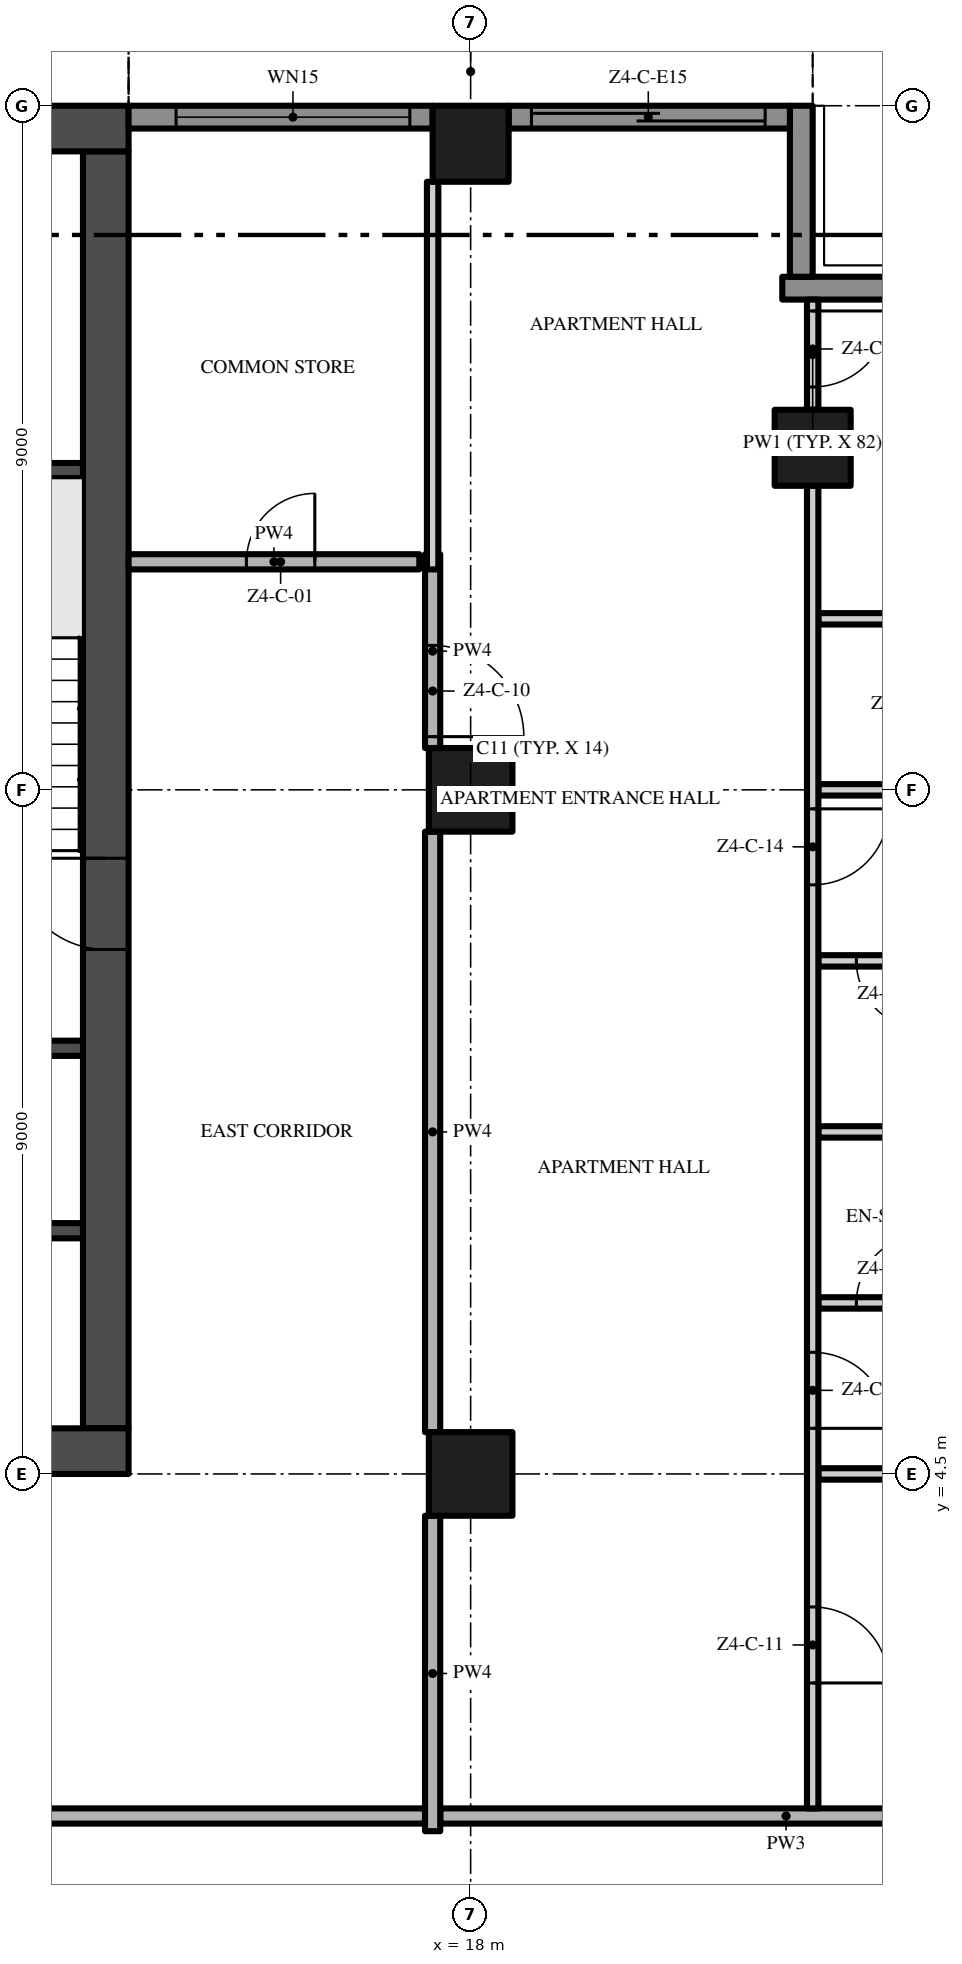
"""IFC4 building model, lengths in metres.
Left out: names, types, materials, properties, quantities, classifications, styles, units other than length and angle.
Written with IfcOpenShell. Run it as: python <this file> out.ifc"""

import sys

from ifc_helpers import new_model, si_unit, direction, frame, frame_2d, origin, origin_2d, place, context, subcontext, project, spatial, rectangle, extrude, element, fill, save


model = new_model("IFC4")
c1 = context("Model", 3, precision=1e-05, world=origin(), true_north=direction((0.0, 1.0)))
c2 = subcontext(c1, "Body", "Model", "MODEL_VIEW")
j1 = project(units=[si_unit("LENGTHUNIT", "METRE"), si_unit("PLANEANGLEUNIT", "RADIAN")], contexts=[c1])
p1 = place(None, origin())
s1 = spatial("IfcSite", under=j1, at=p1, CompositionType="ELEMENT")
p2 = place(p1, origin())
s2 = spatial("IfcBuilding", under=s1, at=p2, CompositionType="ELEMENT")
p3 = place(p2, frame((0.0, 0.0, 211.0)))
s3 = spatial("IfcBuildingStorey", under=s2, at=p3, CompositionType="ELEMENT", Elevation=211.0)
p4 = place(p3, frame((-13.5, 4.8, -0.3), z_axis=(0.0, 0.0, 1.0), x_axis=(1.0, 0.0, 0.0)))
e1 = element("IfcWall", 1, at=p4, inside=s3, PredefinedType="SHEAR", context=c2, shape_type="SweptSolid", body=[
    extrude(rectangle(XDim=27.0, YDim=0.6, at=frame_2d((13.5, 0.0))), origin(), (0.0, 0.0, 1.0), 3.8),
])
p5 = place(p4, frame((12.0, 0.0, 0.3)))
e2 = element("IfcOpeningElement", 2, at=p5, cuts=e1, PredefinedType="OPENING", context=c2, shape_type="SweptSolid", body=[
    extrude(rectangle(XDim=3.0, YDim=2.4, at=frame_2d((1.5, 1.2))), frame((0.0, 0.31, 0.0), z_axis=(0.0, -1.0, 0.0), x_axis=(1.0, 0.0, 0.0)), (0.0, 0.0, 1.0), 0.62),
])
p6 = place(p4, frame((4.9, 0.0, 0.3)))
e3 = element("IfcOpeningElement", 3, at=p6, cuts=e1, PredefinedType="OPENING", context=c2, shape_type="SweptSolid", body=[
    extrude(rectangle(XDim=1.2, YDim=2.2, at=frame_2d((0.6, 1.1))), frame((0.0, 0.31, 0.0), z_axis=(0.0, -1.0, 0.0), x_axis=(1.0, 0.0, 0.0)), (0.0, 0.0, 1.0), 0.62),
])
p7 = place(p4, frame((20.75, 0.0, 0.3)))
e4 = element("IfcOpeningElement", 4, at=p7, cuts=e1, PredefinedType="OPENING", context=c2, shape_type="SweptSolid", body=[
    extrude(rectangle(XDim=1.5, YDim=2.2, at=frame_2d((0.75, 1.1))), frame((0.0, 0.31, 0.0), z_axis=(0.0, -1.0, 0.0), x_axis=(1.0, 0.0, 0.0)), (0.0, 0.0, 1.0), 0.62),
])
p8 = place(p4, frame((17.4, 0.0, 0.3)))
e5 = element("IfcOpeningElement", 5, at=p8, cuts=e1, PredefinedType="OPENING", context=c2, shape_type="SweptSolid", body=[
    extrude(rectangle(XDim=1.2, YDim=2.2, at=frame_2d((0.6, 1.1))), frame((0.0, 0.31, 0.0), z_axis=(0.0, -1.0, 0.0), x_axis=(1.0, 0.0, 0.0)), (0.0, 0.0, 1.0), 0.62),
])
p9 = place(p3, frame((13.2, 5.1, -0.3), z_axis=(0.0, 0.0, 1.0), x_axis=(0.0, 1.0, 0.0)))
e6 = element("IfcWall", 6, at=p9, inside=s3, PredefinedType="SHEAR", context=c2, shape_type="SweptSolid", body=[
    extrude(rectangle(XDim=16.8, YDim=0.6, at=frame_2d((8.4, 0.0))), origin(), (0.0, 0.0, 1.0), 3.8),
])
p10 = place(p9, frame((6.3, 0.0, 0.3)))
e7 = element("IfcOpeningElement", 7, at=p10, cuts=e6, PredefinedType="OPENING", context=c2, shape_type="SweptSolid", body=[
    extrude(rectangle(XDim=1.2, YDim=2.2, at=frame_2d((0.6, 1.1))), frame((0.0, 0.31, 0.0), z_axis=(0.0, -1.0, 0.0), x_axis=(1.0, 0.0, 0.0)), (0.0, 0.0, 1.0), 0.62),
])
p11 = place(p3, frame((13.5, 22.2, -0.3), z_axis=(0.0, 0.0, 1.0), x_axis=(-1.0, 0.0, 0.0)))
e8 = element("IfcWall", 8, at=p11, inside=s3, PredefinedType="SHEAR", context=c2, shape_type="SweptSolid", body=[
    extrude(rectangle(XDim=27.0, YDim=0.6, at=frame_2d((13.5, 0.0))), origin(), (0.0, 0.0, 1.0), 3.8),
])
p12 = place(p3, frame((18.0, 13.5, 0.0), z_axis=(0.0, 0.0, 1.0), x_axis=(1.0, 0.0, 0.0)))
e9 = element("IfcColumn", 9, at=p12, inside=s3, PredefinedType="COLUMN", context=c2, shape_type="SweptSolid", body=[
    extrude(rectangle(XDim=1.1, YDim=1.1, at=origin_2d()), origin(), (0.0, 0.0, 1.0), 3.5),
])
p13 = place(p3, frame((18.0, 22.0, 0.0), z_axis=(0.0, 0.0, 1.0), x_axis=(1.0, 0.0, 0.0)))
e10 = element("IfcColumn", 10, at=p13, inside=s3, PredefinedType="COLUMN", context=c2, shape_type="SweptSolid", body=[
    extrude(rectangle(XDim=1.0, YDim=1.0, at=origin_2d()), origin(), (0.0, 0.0, 1.0), 3.5),
])
p14 = place(p3, frame((18.0, 4.5, 0.0), z_axis=(0.0, 0.0, 1.0), x_axis=(1.0, 0.0, 0.0)))
e11 = element("IfcColumn", 11, at=p14, inside=s3, PredefinedType="COLUMN", context=c2, shape_type="SweptSolid", body=[
    extrude(rectangle(XDim=1.1, YDim=1.1, at=origin_2d()), origin(), (0.0, 0.0, 1.0), 3.5),
])
p15 = place(p3, frame((22.5, 18.0, 0.0), z_axis=(0.0, 0.0, 1.0), x_axis=(1.0, 0.0, 0.0)))
e12 = element("IfcColumn", 12, at=p15, inside=s3, PredefinedType="COLUMN", context=c2, shape_type="SweptSolid", body=[
    extrude(rectangle(XDim=1.0, YDim=1.0, at=origin_2d()), origin(), (0.0, 0.0, 1.0), 3.5),
])
p16 = place(p3, frame((22.1, 20.1, 0.0), z_axis=(0.0, 0.0, 1.0), x_axis=(1.0, 0.0, 0.0)))
e13 = element("IfcWall", 13, at=p16, inside=s3, PredefinedType="SOLIDWALL", context=c2, shape_type="SweptSolid", body=[
    extrude(rectangle(XDim=2.35, YDim=0.3, at=frame_2d((1.175, 0.0))), origin(), (0.0, 0.0, 1.0), 3.5),
])
p17 = place(p3, frame((22.35, 22.5, 0.0), z_axis=(0.0, 0.0, 1.0), x_axis=(0.0, -1.0, 0.0)))
e14 = element("IfcWall", 14, at=p17, inside=s3, PredefinedType="SOLIDWALL", context=c2, shape_type="SweptSolid", body=[
    extrude(rectangle(XDim=2.25, YDim=0.3, at=frame_2d((1.125, 0.0))), origin(), (0.0, 0.0, 1.0), 3.5),
])
p18 = place(p3, frame((18.5, 22.35, 0.0), z_axis=(0.0, 0.0, 1.0), x_axis=(1.0, 0.0, 0.0)))
e15 = element("IfcWall", 15, at=p18, inside=s3, PredefinedType="SOLIDWALL", context=c2, shape_type="SweptSolid", body=[
    extrude(rectangle(XDim=3.7, YDim=0.3, at=frame_2d((1.85, 0.0))), origin(), (0.0, 0.0, 1.0), 3.5),
])
p19 = place(p18, frame((0.3, 0.0, 0.0)))
e16 = element("IfcOpeningElement", 16, at=p19, cuts=e15, PredefinedType="OPENING", context=c2, shape_type="SweptSolid", body=[
    extrude(rectangle(XDim=3.075, YDim=2.4, at=frame_2d((1.538, 1.2))), frame((0.0, 0.16, 0.0), z_axis=(0.0, -1.0, 0.0), x_axis=(1.0, 0.0, 0.0)), (0.0, 0.0, 1.0), 0.32),
])
p20 = place(p3, frame((13.5, 22.35, 0.0), z_axis=(0.0, 0.0, 1.0), x_axis=(1.0, 0.0, 0.0)))
e17 = element("IfcWall", 17, at=p20, inside=s3, PredefinedType="SOLIDWALL", context=c2, shape_type="SweptSolid", body=[
    extrude(rectangle(XDim=4.0, YDim=0.3, at=frame_2d((2.0, 0.0))), origin(), (0.0, 0.0, 1.0), 3.5),
])
p21 = place(p20, frame((0.625, 0.0, 0.45)))
e18 = element("IfcOpeningElement", 18, at=p21, cuts=e17, PredefinedType="OPENING", context=c2, shape_type="SweptSolid", body=[
    extrude(rectangle(XDim=3.075, YDim=2.65, at=frame_2d((1.538, 1.325))), frame((0.0, 0.16, 0.0), z_axis=(0.0, -1.0, 0.0), x_axis=(1.0, 0.0, 0.0)), (0.0, 0.0, 1.0), 0.32),
])
for number, where, z_axis, x_axis in (
    (19, (9.65, 7.7, 0.0), (0.0, 0.0, 1.0), (1.0, 0.0, 0.0)),
    (20, (9.65, 10.1, 0.0), (0.0, 0.0, 1.0), (1.0, 0.0, 0.0)),
    (21, (9.65, 17.7, 0.0), (0.0, 0.0, 1.0), (1.0, 0.0, 0.0)),
):
    element("IfcWall", number, at=place(p3, frame(where, z_axis=z_axis, x_axis=x_axis)), inside=s3, PredefinedType="SHEAR", context=c2, shape_type="SweptSolid", body=[
        extrude(rectangle(XDim=3.25, YDim=0.2, at=frame_2d((1.625, 0.0))), origin(), (0.0, 0.0, 1.0), 3.5),
    ])
p22 = place(p3, frame((17.4, 0.0, 0.0), z_axis=(0.0, 0.0, 1.0), x_axis=(-1.0, 0.0, 0.0)))
e22 = element("IfcWall", 22, at=p22, inside=s3, PredefinedType="PARTITIONING", context=c2, shape_type="SweptSolid", body=[
    extrude(rectangle(XDim=17.3, YDim=0.2, at=frame_2d((8.65, 0.0))), origin(), (0.0, 0.0, 1.0), 3.5),
])
p23 = place(p22, frame((7.65, 0.0, 0.0)))
e23 = element("IfcOpeningElement", 23, at=p23, cuts=e22, PredefinedType="OPENING", context=c2, shape_type="SweptSolid", body=[
    extrude(rectangle(XDim=1.5, YDim=2.4, at=frame_2d((0.75, 1.2))), frame((0.0, 0.11, 0.0), z_axis=(0.0, -1.0, 0.0), x_axis=(1.0, 0.0, 0.0)), (0.0, 0.0, 1.0), 0.22),
])
p24 = place(p3, frame((17.6, 0.0, 0.0), z_axis=(0.0, 0.0, 1.0), x_axis=(1.0, 0.0, 0.0)))
e24 = element("IfcWall", 24, at=p24, inside=s3, PredefinedType="PARTITIONING", context=c2, shape_type="SweptSolid", body=[
    extrude(rectangle(XDim=9.1, YDim=0.2, at=frame_2d((4.55, 0.0))), origin(), (0.0, 0.0, 1.0), 3.5),
])
p25 = place(p3, frame((22.575, 4.5, 0.0), z_axis=(0.0, 0.0, 1.0), x_axis=(1.0, 0.0, 0.0)))
e25 = element("IfcWall", 25, at=p25, inside=s3, PredefinedType="PARTITIONING", context=c2, shape_type="SweptSolid", body=[
    extrude(rectangle(XDim=3.425, YDim=0.15, at=frame_2d((1.712, 0.0))), origin(), (0.0, 0.0, 1.0), 3.5),
])
p26 = place(p3, frame((22.575, 6.75, 0.0), z_axis=(0.0, 0.0, 1.0), x_axis=(1.0, 0.0, 0.0)))
e26 = element("IfcWall", 26, at=p26, inside=s3, PredefinedType="PARTITIONING", context=c2, shape_type="SweptSolid", body=[
    extrude(rectangle(XDim=1.875, YDim=0.15, at=frame_2d((0.938, 0.0))), origin(), (0.0, 0.0, 1.0), 3.5),
])
p27 = place(p26, frame((0.5, 0.0, 0.0)))
e27 = element("IfcOpeningElement", 27, at=p27, cuts=e26, PredefinedType="OPENING", context=c2, shape_type="SweptSolid", body=[
    extrude(rectangle(XDim=0.9, YDim=2.1, at=frame_2d((0.45, 1.05))), frame((0.0, 0.085, 0.0), z_axis=(0.0, -1.0, 0.0), x_axis=(1.0, 0.0, 0.0)), (0.0, 0.0, 1.0), 0.17),
])
p28 = place(p3, frame((22.575, 9.0, 0.0), z_axis=(0.0, 0.0, 1.0), x_axis=(1.0, 0.0, 0.0)))
e28 = element("IfcWall", 28, at=p28, inside=s3, PredefinedType="PARTITIONING", context=c2, shape_type="SweptSolid", body=[
    extrude(rectangle(XDim=1.875, YDim=0.15, at=frame_2d((0.938, 0.0))), origin(), (0.0, 0.0, 1.0), 3.5),
])
p29 = place(p3, frame((24.45, 11.25, 0.0), z_axis=(0.0, 0.0, 1.0), x_axis=(-1.0, 0.0, 0.0)))
e29 = element("IfcWall", 29, at=p29, inside=s3, PredefinedType="PARTITIONING", context=c2, shape_type="SweptSolid", body=[
    extrude(rectangle(XDim=1.875, YDim=0.15, at=frame_2d((0.938, 0.0))), origin(), (0.0, 0.0, 1.0), 3.5),
])
p30 = place(p29, frame((0.475, 0.0, 0.0)))
e30 = element("IfcOpeningElement", 30, at=p30, cuts=e29, PredefinedType="OPENING", context=c2, shape_type="SweptSolid", body=[
    extrude(rectangle(XDim=0.9, YDim=2.1, at=frame_2d((0.45, 1.05))), frame((0.0, 0.085, 0.0), z_axis=(0.0, -1.0, 0.0), x_axis=(1.0, 0.0, 0.0)), (0.0, 0.0, 1.0), 0.17),
])
p31 = place(p3, frame((22.575, 13.5, 0.0), z_axis=(0.0, 0.0, 1.0), x_axis=(1.0, 0.0, 0.0)))
e31 = element("IfcWall", 31, at=p31, inside=s3, PredefinedType="PARTITIONING", context=c2, shape_type="SweptSolid", body=[
    extrude(rectangle(XDim=3.425, YDim=0.15, at=frame_2d((1.712, 0.0))), origin(), (0.0, 0.0, 1.0), 3.5),
])
p32 = place(p3, frame((22.575, 15.75, 0.0), z_axis=(0.0, 0.0, 1.0), x_axis=(1.0, 0.0, 0.0)))
e32 = element("IfcWall", 32, at=p32, inside=s3, PredefinedType="PARTITIONING", context=c2, shape_type="SweptSolid", body=[
    extrude(rectangle(XDim=1.875, YDim=0.15, at=frame_2d((0.938, 0.0))), origin(), (0.0, 0.0, 1.0), 3.5),
])
p33 = place(p3, frame((13.5, 16.5, 0.0), z_axis=(0.0, 0.0, 1.0), x_axis=(1.0, 0.0, 0.0)))
e33 = element("IfcWall", 33, at=p33, inside=s3, PredefinedType="PARTITIONING", context=c2, shape_type="SweptSolid", body=[
    extrude(rectangle(XDim=3.825, YDim=0.2, at=frame_2d((1.913, 0.0))), origin(), (0.0, 0.0, 1.0), 3.5),
])
p34 = place(p33, frame((1.55, 0.0, 0.0)))
e34 = element("IfcOpeningElement", 34, at=p34, cuts=e33, PredefinedType="OPENING", context=c2, shape_type="SweptSolid", body=[
    extrude(rectangle(XDim=0.9, YDim=2.1, at=frame_2d((0.45, 1.05))), frame((0.0, 0.11, 0.0), z_axis=(0.0, -1.0, 0.0), x_axis=(1.0, 0.0, 0.0)), (0.0, 0.0, 1.0), 0.22),
])
p35 = place(p3, frame((17.5, -0.2, 0.0), z_axis=(0.0, 0.0, 1.0), x_axis=(0.0, 1.0, 0.0)))
e35 = element("IfcWall", 35, at=p35, inside=s3, PredefinedType="PARTITIONING", context=c2, shape_type="SweptSolid", body=[
    extrude(rectangle(XDim=4.15, YDim=0.2, at=frame_2d((2.075, 0.0))), origin(), (0.0, 0.0, 1.0), 3.5),
])
p36 = place(p3, frame((17.5, 5.05, 0.0), z_axis=(0.0, 0.0, 1.0), x_axis=(0.0, 1.0, 0.0)))
e36 = element("IfcWall", 36, at=p36, inside=s3, PredefinedType="PARTITIONING", context=c2, shape_type="SweptSolid", body=[
    extrude(rectangle(XDim=7.9, YDim=0.2, at=frame_2d((3.95, 0.0))), origin(), (0.0, 0.0, 1.0), 3.5),
])
p37 = place(p3, frame((17.5, 16.6, 0.0), z_axis=(0.0, 0.0, 1.0), x_axis=(0.0, -1.0, 0.0)))
e37 = element("IfcWall", 37, at=p37, inside=s3, PredefinedType="PARTITIONING", context=c2, shape_type="SweptSolid", body=[
    extrude(rectangle(XDim=2.55, YDim=0.2, at=frame_2d((1.275, 0.0))), origin(), (0.0, 0.0, 1.0), 3.5),
])
p38 = place(p37, frame((1.2, 0.0, 0.0)))
e38 = element("IfcOpeningElement", 38, at=p38, cuts=e37, PredefinedType="OPENING", context=c2, shape_type="SweptSolid", body=[
    extrude(rectangle(XDim=1.2, YDim=2.4, at=frame_2d((0.6, 1.2))), frame((0.0, 0.11, 0.0), z_axis=(0.0, -1.0, 0.0), x_axis=(1.0, 0.0, 0.0)), (0.0, 0.0, 1.0), 0.22),
])
p39 = place(p3, frame((17.5, 16.4, 0.0), z_axis=(0.0, 0.0, 1.0), x_axis=(0.0, 1.0, 0.0)))
e39 = element("IfcWall", 39, at=p39, inside=s3, PredefinedType="PARTITIONING", context=c2, shape_type="SweptSolid", body=[
    extrude(rectangle(XDim=5.1, YDim=0.15, at=frame_2d((2.55, 0.0))), origin(), (0.0, 0.0, 1.0), 3.5),
])
p40 = place(p3, frame((22.5, 17.5, 0.0), z_axis=(0.0, 0.0, 1.0), x_axis=(0.0, -1.0, 0.0)))
e40 = element("IfcWall", 40, at=p40, inside=s3, PredefinedType="PARTITIONING", context=c2, shape_type="SweptSolid", body=[
    extrude(rectangle(XDim=17.4, YDim=0.15, at=frame_2d((8.7, 0.0))), origin(), (0.0, 0.0, 1.0), 3.5),
])
p41 = place(p40, frame((14.75, 0.0, 0.0)))
e41 = element("IfcOpeningElement", 41, at=p41, cuts=e40, PredefinedType="OPENING", context=c2, shape_type="SweptSolid", body=[
    extrude(rectangle(XDim=1.0, YDim=2.4, at=frame_2d((0.5, 1.2))), frame((0.0, 0.085, 0.0), z_axis=(0.0, -1.0, 0.0), x_axis=(1.0, 0.0, 0.0)), (0.0, 0.0, 1.0), 0.17),
])
p42 = place(p40, frame((11.4, 0.0, 0.0)))
e42 = element("IfcOpeningElement", 42, at=p42, cuts=e40, PredefinedType="OPENING", context=c2, shape_type="SweptSolid", body=[
    extrude(rectangle(XDim=1.0, YDim=2.4, at=frame_2d((0.5, 1.2))), frame((0.0, 0.085, 0.0), z_axis=(0.0, -1.0, 0.0), x_axis=(1.0, 0.0, 0.0)), (0.0, 0.0, 1.0), 0.17),
])
p43 = place(p40, frame((4.25, 0.0, 0.0)))
e43 = element("IfcOpeningElement", 43, at=p43, cuts=e40, PredefinedType="OPENING", context=c2, shape_type="SweptSolid", body=[
    extrude(rectangle(XDim=1.0, YDim=2.4, at=frame_2d((0.5, 1.2))), frame((0.0, 0.085, 0.0), z_axis=(0.0, -1.0, 0.0), x_axis=(1.0, 0.0, 0.0)), (0.0, 0.0, 1.0), 0.17),
])
p44 = place(p3, frame((22.5, 19.95, 0.0), z_axis=(0.0, 0.0, 1.0), x_axis=(0.0, -1.0, 0.0)))
e44 = element("IfcWall", 44, at=p44, inside=s3, PredefinedType="PARTITIONING", context=c2, shape_type="SweptSolid", body=[
    extrude(rectangle(XDim=1.45, YDim=0.15, at=frame_2d((0.725, 0.0))), origin(), (0.0, 0.0, 1.0), 3.5),
])
p45 = place(p44, frame((0.15, 0.0, 0.0)))
e45 = element("IfcOpeningElement", 45, at=p45, cuts=e44, PredefinedType="OPENING", context=c2, shape_type="SweptSolid", body=[
    extrude(rectangle(XDim=1.0, YDim=2.4, at=frame_2d((0.5, 1.2))), frame((0.0, 0.085, 0.0), z_axis=(0.0, -1.0, 0.0), x_axis=(1.0, 0.0, 0.0)), (0.0, 0.0, 1.0), 0.17),
])
p46 = place(p19, origin())
e46 = element("IfcDoor", 46, at=p46, inside=s3, OperationType="SINGLE_SWING_LEFT", PredefinedType="DOOR", context=c2, shape_type="SweptSolid", body=[
    extrude(rectangle(XDim=3.075, YDim=2.4, at=frame_2d((1.538, 1.2))), frame((0.0, 0.025, 0.0), z_axis=(0.0, -1.0, 0.0), x_axis=(1.0, 0.0, 0.0)), (0.0, 0.0, 1.0), 0.05),
])
fill(e16, e46)
p47 = place(p21, origin())
e47 = element("IfcWindow", 47, at=p47, inside=s3, PartitioningType="SINGLE_PANEL", PredefinedType="WINDOW", context=c2, shape_type="SweptSolid", body=[
    extrude(rectangle(XDim=3.075, YDim=2.65, at=frame_2d((1.538, 1.325))), frame((0.0, 0.03, 0.0), z_axis=(0.0, -1.0, 0.0), x_axis=(1.0, 0.0, 0.0)), (0.0, 0.0, 1.0), 0.06),
])
fill(e18, e47)
p48 = place(p10, frame((1.2, 0.0, 0.0), z_axis=(0.0, 0.0, 1.0), x_axis=(-1.0, 0.0, 0.0)))
e48 = element("IfcDoor", 48, at=p48, inside=s3, OperationType="SINGLE_SWING_LEFT", PredefinedType="DOOR", context=c2, shape_type="SweptSolid", body=[
    extrude(rectangle(XDim=1.2, YDim=2.2, at=frame_2d((0.6, 1.1))), frame((0.0, 0.025, 0.0), z_axis=(0.0, -1.0, 0.0), x_axis=(1.0, 0.0, 0.0)), (0.0, 0.0, 1.0), 0.05),
])
fill(e7, e48)
p49 = place(p34, origin())
e49 = element("IfcDoor", 49, at=p49, inside=s3, OperationType="SINGLE_SWING_RIGHT", PredefinedType="DOOR", context=c2, shape_type="SweptSolid", body=[
    extrude(rectangle(XDim=0.9, YDim=2.1, at=frame_2d((0.45, 1.05))), frame((0.0, 0.025, 0.0), z_axis=(0.0, -1.0, 0.0), x_axis=(1.0, 0.0, 0.0)), (0.0, 0.0, 1.0), 0.05),
])
fill(e34, e49)
p50 = place(p38, origin())
e50 = element("IfcDoor", 50, at=p50, inside=s3, OperationType="SINGLE_SWING_RIGHT", PredefinedType="DOOR", context=c2, shape_type="SweptSolid", body=[
    extrude(rectangle(XDim=1.2, YDim=2.4, at=frame_2d((0.6, 1.2))), frame((0.0, 0.025, 0.0), z_axis=(0.0, -1.0, 0.0), x_axis=(1.0, 0.0, 0.0)), (0.0, 0.0, 1.0), 0.05),
])
fill(e38, e50)
p51 = place(p41, origin())
e51 = element("IfcDoor", 51, at=p51, inside=s3, OperationType="SINGLE_SWING_RIGHT", PredefinedType="DOOR", context=c2, shape_type="SweptSolid", body=[
    extrude(rectangle(XDim=1.0, YDim=2.4, at=frame_2d((0.5, 1.2))), frame((0.0, 0.025, 0.0), z_axis=(0.0, -1.0, 0.0), x_axis=(1.0, 0.0, 0.0)), (0.0, 0.0, 1.0), 0.05),
])
fill(e41, e51)
p52 = place(p42, origin())
e52 = element("IfcDoor", 52, at=p52, inside=s3, OperationType="SINGLE_SWING_RIGHT", PredefinedType="DOOR", context=c2, shape_type="SweptSolid", body=[
    extrude(rectangle(XDim=1.0, YDim=2.4, at=frame_2d((0.5, 1.2))), frame((0.0, 0.025, 0.0), z_axis=(0.0, -1.0, 0.0), x_axis=(1.0, 0.0, 0.0)), (0.0, 0.0, 1.0), 0.05),
])
fill(e42, e52)
p53 = place(p27, origin())
e53 = element("IfcDoor", 53, at=p53, inside=s3, OperationType="SINGLE_SWING_RIGHT", PredefinedType="DOOR", context=c2, shape_type="SweptSolid", body=[
    extrude(rectangle(XDim=0.9, YDim=2.1, at=frame_2d((0.45, 1.05))), frame((0.0, 0.025, 0.0), z_axis=(0.0, -1.0, 0.0), x_axis=(1.0, 0.0, 0.0)), (0.0, 0.0, 1.0), 0.05),
])
fill(e27, e53)
p54 = place(p43, origin())
e54 = element("IfcDoor", 54, at=p54, inside=s3, OperationType="SINGLE_SWING_LEFT", PredefinedType="DOOR", context=c2, shape_type="SweptSolid", body=[
    extrude(rectangle(XDim=1.0, YDim=2.4, at=frame_2d((0.5, 1.2))), frame((0.0, 0.025, 0.0), z_axis=(0.0, -1.0, 0.0), x_axis=(1.0, 0.0, 0.0)), (0.0, 0.0, 1.0), 0.05),
])
fill(e43, e54)
p55 = place(p30, origin())
e55 = element("IfcDoor", 55, at=p55, inside=s3, OperationType="SINGLE_SWING_LEFT", PredefinedType="DOOR", context=c2, shape_type="SweptSolid", body=[
    extrude(rectangle(XDim=0.9, YDim=2.1, at=frame_2d((0.45, 1.05))), frame((0.0, 0.025, 0.0), z_axis=(0.0, -1.0, 0.0), x_axis=(1.0, 0.0, 0.0)), (0.0, 0.0, 1.0), 0.05),
])
fill(e30, e55)
p56 = place(p45, origin())
e56 = element("IfcDoor", 56, at=p56, inside=s3, OperationType="SINGLE_SWING_LEFT", PredefinedType="DOOR", context=c2, shape_type="SweptSolid", body=[
    extrude(rectangle(XDim=1.0, YDim=2.4, at=frame_2d((0.5, 1.2))), frame((0.0, 0.025, 0.0), z_axis=(0.0, -1.0, 0.0), x_axis=(1.0, 0.0, 0.0)), (0.0, 0.0, 1.0), 0.05),
])
fill(e45, e56)
save(model, sys.argv[1])
